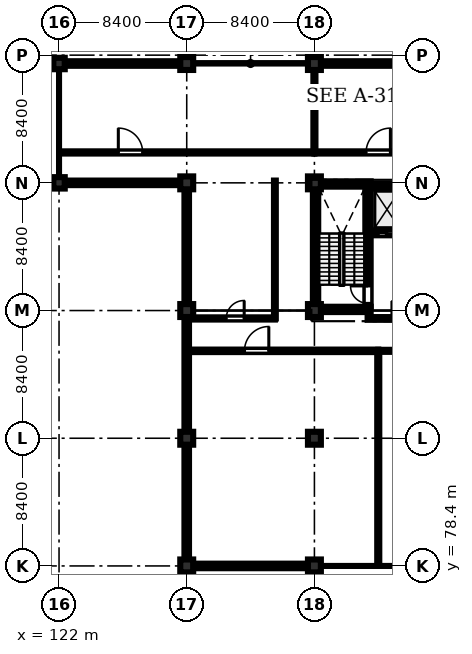
"""IFC4 building model, lengths in metres.
Left out: names, types, materials, properties, quantities, classifications, styles, units other than length and angle.
Written with IfcOpenShell. Run it as: python <this file> out.ifc"""

import sys

from ifc_helpers import new_model, si_unit, direction, frame, frame_2d, origin, origin_2d, place, context, subcontext, project, spatial, rectangle, extrude, element, fill, save


model = new_model("IFC4")
c1 = context("Model", 3, precision=1e-05, world=origin(), true_north=direction((0.0, 1.0)))
c2 = subcontext(c1, "Body", "Model", "MODEL_VIEW")
j1 = project(units=[si_unit("LENGTHUNIT", "METRE"), si_unit("PLANEANGLEUNIT", "RADIAN")], contexts=[c1])
p1 = place(None, origin())
s1 = spatial("IfcSite", under=j1, at=p1, CompositionType="ELEMENT")
p2 = place(p1, origin())
s2 = spatial("IfcBuilding", under=s1, at=p2, CompositionType="ELEMENT")
p3 = place(p2, frame((0.0, 0.0, 31.8)))
s3 = spatial("IfcBuildingStorey", under=s2, at=p3, CompositionType="ELEMENT", Elevation=31.8)
for number, where, z_axis, x_axis in (
    (1, (122.0, 103.6, 0.0), (0.0, 0.0, 1.0), (1.0, 0.0, 0.0)),
    (2, (122.0, 111.45, 0.0), (0.0, 0.0, 1.0), (1.0, 0.0, 0.0)),
):
    element("IfcColumn", number, at=place(p3, frame(where, z_axis=z_axis, x_axis=x_axis)), inside=s3, PredefinedType="COLUMN", context=c2, shape_type="SweptSolid", body=[
        extrude(rectangle(XDim=0.75, YDim=0.75, at=origin_2d()), origin(), (0.0, 0.0, 1.0), 4.02),
    ])
for number, where, z_axis, x_axis in (
    (3, (130.4, 78.4, 0.0), (0.0, 0.0, 1.0), (1.0, 0.0, 0.0)),
    (4, (130.4, 86.8, 0.0), (0.0, 0.0, 1.0), (1.0, 0.0, 0.0)),
    (5, (130.4, 95.2, 0.0), (0.0, 0.0, 1.0), (1.0, 0.0, 0.0)),
    (6, (130.4, 103.6, 0.0), (0.0, 0.0, 1.0), (1.0, 0.0, 0.0)),
    (7, (130.4, 111.45, 0.0), (0.0, 0.0, 1.0), (1.0, 0.0, 0.0)),
    (8, (138.8, 78.4, 0.0), (0.0, 0.0, 1.0), (1.0, 0.0, 0.0)),
    (9, (138.8, 86.8, 0.0), (0.0, 0.0, 1.0), (1.0, 0.0, 0.0)),
    (10, (138.8, 95.2, 0.0), (0.0, 0.0, 1.0), (1.0, 0.0, 0.0)),
    (11, (138.8, 103.6, 0.0), (0.0, 0.0, 1.0), (1.0, 0.0, 0.0)),
    (12, (138.8, 111.45, 0.0), (0.0, 0.0, 1.0), (1.0, 0.0, 0.0)),
):
    element("IfcColumn", number, at=place(p3, frame(where, z_axis=z_axis, x_axis=x_axis)), inside=s3, PredefinedType="COLUMN", context=c2, shape_type="SweptSolid", body=[
        extrude(rectangle(XDim=0.85, YDim=0.85, at=origin_2d()), origin(), (0.0, 0.0, 1.0), 4.02),
    ])
for number, where, z_axis, x_axis in (
    (13, (138.7, 95.275, 0.0), (0.0, 0.0, 1.0), (1.0, 0.0, 0.0)),
    (14, (138.7, 103.525, 0.0), (0.0, 0.0, 1.0), (1.0, 0.0, 0.0)),
):
    element("IfcWall", number, at=place(p3, frame(where, z_axis=z_axis, x_axis=x_axis)), inside=s3, PredefinedType="SHEAR", context=c2, shape_type="SweptSolid", body=[
        extrude(rectangle(XDim=3.8, YDim=0.35, at=frame_2d((1.9, 0.0))), origin(), (0.0, 0.0, 1.0), 4.02),
    ])
p4 = place(p3, frame((138.875, 95.45, 0.0), z_axis=(0.0, 0.0, 1.0), x_axis=(0.0, 1.0, 0.0)))
e15 = element("IfcWall", 15, at=p4, inside=s3, PredefinedType="SHEAR", context=c2, shape_type="SweptSolid", body=[
    extrude(rectangle(XDim=7.9, YDim=0.35, at=frame_2d((3.95, 0.0))), origin(), (0.0, 0.0, 1.0), 4.02),
])
p5 = place(p3, frame((142.325, 95.45, 0.0), z_axis=(0.0, 0.0, 1.0), x_axis=(0.0, 1.0, 0.0)))
e16 = element("IfcWall", 16, at=p5, inside=s3, PredefinedType="SHEAR", context=c2, shape_type="SweptSolid", body=[
    extrude(rectangle(XDim=7.9, YDim=0.35, at=frame_2d((3.95, 0.0))), origin(), (0.0, 0.0, 1.0), 4.02),
])
p6 = place(p5, frame((0.22, 0.0, 0.0)))
e17 = element("IfcOpeningElement", 17, at=p6, cuts=e16, PredefinedType="OPENING", context=c2, shape_type="SweptSolid", body=[
    extrude(rectangle(XDim=1.15, YDim=2.15, at=frame_2d((0.575, 1.075))), frame((0.0, 0.185, 0.0), z_axis=(0.0, -1.0, 0.0), x_axis=(1.0, 0.0, 0.0)), (0.0, 0.0, 1.0), 0.37),
])
p7 = place(p3, frame((142.5, 100.275, 0.0), z_axis=(0.0, 0.0, 1.0), x_axis=(1.0, 0.0, 0.0)))
e18 = element("IfcWall", 18, at=p7, inside=s3, PredefinedType="SHEAR", context=c2, shape_type="SweptSolid", body=[
    extrude(rectangle(XDim=2.1, YDim=0.25, at=frame_2d((1.05, 0.0))), origin(), (0.0, 0.0, 1.0), 4.02),
])
p8 = place(p7, frame((0.5, 0.0, 0.0)))
e19 = element("IfcOpeningElement", 19, at=p8, cuts=e18, PredefinedType="OPENING", context=c2, shape_type="SweptSolid", body=[
    extrude(rectangle(XDim=1.1, YDim=2.15, at=frame_2d((0.55, 1.075))), frame((0.0, 0.135, 0.0), z_axis=(0.0, -1.0, 0.0), x_axis=(1.0, 0.0, 0.0)), (0.0, 0.0, 1.0), 0.27),
])
p9 = place(p3, frame((142.5, 103.425, 0.0), z_axis=(0.0, 0.0, 1.0), x_axis=(1.0, 0.0, 0.0)))
e20 = element("IfcWall", 20, at=p9, inside=s3, PredefinedType="SHEAR", context=c2, shape_type="SweptSolid", body=[
    extrude(rectangle(XDim=2.1, YDim=0.25, at=frame_2d((1.05, 0.0))), origin(), (0.0, 0.0, 1.0), 4.02),
])
p10 = place(p3, frame((122.375, 111.45, 0.0), z_axis=(0.0, 0.0, 1.0), x_axis=(1.0, 0.0, 0.0)))
e21 = element("IfcWall", 21, at=p10, inside=s3, PredefinedType="STANDARD", context=c2, shape_type="SweptSolid", body=[
    extrude(rectangle(XDim=7.6, YDim=0.3, at=frame_2d((3.8, 0.0))), origin(), (0.0, 0.0, 1.0), 3.32),
])
p11 = place(p10, frame((0.85, 0.0, 0.9)))
e22 = element("IfcOpeningElement", 22, at=p11, cuts=e21, PredefinedType="OPENING", context=c2, shape_type="SweptSolid", body=[
    extrude(rectangle(XDim=1.8, YDim=2.1, at=frame_2d((0.9, 1.05))), frame((0.0, 0.16, 0.0), z_axis=(0.0, -1.0, 0.0), x_axis=(1.0, 0.0, 0.0)), (0.0, 0.0, 1.0), 0.32),
])
p12 = place(p10, frame((4.65, 0.0, 0.9)))
e23 = element("IfcOpeningElement", 23, at=p12, cuts=e21, PredefinedType="OPENING", context=c2, shape_type="SweptSolid", body=[
    extrude(rectangle(XDim=1.8, YDim=2.1, at=frame_2d((0.9, 1.05))), frame((0.0, 0.16, 0.0), z_axis=(0.0, -1.0, 0.0), x_axis=(1.0, 0.0, 0.0)), (0.0, 0.0, 1.0), 0.32),
])
p13 = place(p3, frame((139.225, 111.45, 0.0), z_axis=(0.0, 0.0, 1.0), x_axis=(1.0, 0.0, 0.0)))
e24 = element("IfcWall", 24, at=p13, inside=s3, PredefinedType="STANDARD", context=c2, shape_type="SweptSolid", body=[
    extrude(rectangle(XDim=7.55, YDim=0.3, at=frame_2d((3.775, 0.0))), origin(), (0.0, 0.0, 1.0), 3.32),
])
p14 = place(p13, frame((0.85, 0.0, 0.9)))
e25 = element("IfcOpeningElement", 25, at=p14, cuts=e24, PredefinedType="OPENING", context=c2, shape_type="SweptSolid", body=[
    extrude(rectangle(XDim=1.8, YDim=2.1, at=frame_2d((0.9, 1.05))), frame((0.0, 0.16, 0.0), z_axis=(0.0, -1.0, 0.0), x_axis=(1.0, 0.0, 0.0)), (0.0, 0.0, 1.0), 0.32),
])
p15 = place(p13, frame((4.65, 0.0, 0.9)))
e26 = element("IfcOpeningElement", 26, at=p15, cuts=e24, PredefinedType="OPENING", context=c2, shape_type="SweptSolid", body=[
    extrude(rectangle(XDim=1.8, YDim=2.1, at=frame_2d((0.9, 1.05))), frame((0.0, 0.16, 0.0), z_axis=(0.0, -1.0, 0.0), x_axis=(1.0, 0.0, 0.0)), (0.0, 0.0, 1.0), 0.32),
])
p16 = place(p3, frame((138.375, 78.4, 0.0), z_axis=(0.0, 0.0, 1.0), x_axis=(-1.0, 0.0, 0.0)))
e27 = element("IfcWall", 27, at=p16, inside=s3, PredefinedType="STANDARD", context=c2, shape_type="SweptSolid", body=[
    extrude(rectangle(XDim=7.55, YDim=0.3, at=frame_2d((3.775, 0.0))), origin(), (0.0, 0.0, 1.0), 3.32),
])
p17 = place(p16, frame((1.15, 0.0, 0.95)))
e28 = element("IfcOpeningElement", 28, at=p17, cuts=e27, PredefinedType="OPENING", context=c2, shape_type="SweptSolid", body=[
    extrude(rectangle(XDim=2.05, YDim=2.05, at=frame_2d((1.025, 1.025))), frame((0.0, 0.16, 0.0), z_axis=(0.0, -1.0, 0.0), x_axis=(1.0, 0.0, 0.0)), (0.0, 0.0, 1.0), 0.32),
])
p18 = place(p3, frame((130.4, 78.825, 0.0), z_axis=(0.0, 0.0, 1.0), x_axis=(0.0, 1.0, 0.0)))
e29 = element("IfcWall", 29, at=p18, inside=s3, PredefinedType="STANDARD", context=c2, shape_type="SweptSolid", body=[
    extrude(rectangle(XDim=7.55, YDim=0.3, at=frame_2d((3.775, 0.0))), origin(), (0.0, 0.0, 1.0), 3.32),
])
p19 = place(p18, frame((2.4, 0.0, 0.95)))
e30 = element("IfcOpeningElement", 30, at=p19, cuts=e29, PredefinedType="OPENING", context=c2, shape_type="SweptSolid", body=[
    extrude(rectangle(XDim=1.5, YDim=1.8, at=frame_2d((0.75, 0.9))), frame((0.0, 0.16, 0.0), z_axis=(0.0, -1.0, 0.0), x_axis=(1.0, 0.0, 0.0)), (0.0, 0.0, 1.0), 0.32),
])
p20 = place(p3, frame((130.4, 87.225, 0.0), z_axis=(0.0, 0.0, 1.0), x_axis=(0.0, 1.0, 0.0)))
e31 = element("IfcWall", 31, at=p20, inside=s3, PredefinedType="STANDARD", context=c2, shape_type="SweptSolid", body=[
    extrude(rectangle(XDim=7.55, YDim=0.3, at=frame_2d((3.775, 0.0))), origin(), (0.0, 0.0, 1.0), 3.32),
])
p21 = place(p20, frame((2.4, 0.0, 0.95)))
e32 = element("IfcOpeningElement", 32, at=p21, cuts=e31, PredefinedType="OPENING", context=c2, shape_type="SweptSolid", body=[
    extrude(rectangle(XDim=1.5, YDim=1.8, at=frame_2d((0.75, 0.9))), frame((0.0, 0.16, 0.0), z_axis=(0.0, -1.0, 0.0), x_axis=(1.0, 0.0, 0.0)), (0.0, 0.0, 1.0), 0.32),
])
p22 = place(p3, frame((130.4, 95.625, 0.0), z_axis=(0.0, 0.0, 1.0), x_axis=(0.0, 1.0, 0.0)))
e33 = element("IfcWall", 33, at=p22, inside=s3, PredefinedType="STANDARD", context=c2, shape_type="SweptSolid", body=[
    extrude(rectangle(XDim=7.55, YDim=0.3, at=frame_2d((3.775, 0.0))), origin(), (0.0, 0.0, 1.0), 3.32),
])
p23 = place(p22, frame((2.4, 0.0, 1.0)))
e34 = element("IfcOpeningElement", 34, at=p23, cuts=e33, PredefinedType="OPENING", context=c2, shape_type="SweptSolid", body=[
    extrude(rectangle(XDim=1.8, YDim=1.8, at=frame_2d((0.9, 0.9))), frame((0.0, 0.16, 0.0), z_axis=(0.0, -1.0, 0.0), x_axis=(1.0, 0.0, 0.0)), (0.0, 0.0, 1.0), 0.32),
])
p24 = place(p3, frame((129.975, 103.6, 0.0), z_axis=(0.0, 0.0, 1.0), x_axis=(-1.0, 0.0, 0.0)))
e35 = element("IfcWall", 35, at=p24, inside=s3, PredefinedType="STANDARD", context=c2, shape_type="SweptSolid", body=[
    extrude(rectangle(XDim=7.6, YDim=0.3, at=frame_2d((3.8, 0.0))), origin(), (0.0, 0.0, 1.0), 3.32),
])
p25 = place(p3, frame((142.3, 94.68, 0.0), z_axis=(0.0, 0.0, 1.0), x_axis=(1.0, 0.0, 0.0)))
e36 = element("IfcWall", 36, at=p25, inside=s3, PredefinedType="STANDARD", context=c2, shape_type="SweptSolid", body=[
    extrude(rectangle(XDim=4.8, YDim=0.18, at=frame_2d((2.4, 0.0))), origin(), (0.0, 0.0, 1.0), 4.02),
])
p26 = place(p25, frame((1.6, 0.0, 0.0)))
e37 = element("IfcOpeningElement", 37, at=p26, cuts=e36, PredefinedType="OPENING", context=c2, shape_type="SweptSolid", body=[
    extrude(rectangle(XDim=1.15, YDim=2.15, at=frame_2d((0.575, 1.075))), frame((0.0, 0.1, 0.0), z_axis=(0.0, -1.0, 0.0), x_axis=(1.0, 0.0, 0.0)), (0.0, 0.0, 1.0), 0.2),
])
p27 = place(p3, frame((136.2, 94.68, 0.0), z_axis=(0.0, 0.0, 1.0), x_axis=(0.0, 1.0, 0.0)))
e38 = element("IfcWall", 38, at=p27, inside=s3, PredefinedType="PARTITIONING", context=c2, shape_type="SweptSolid", body=[
    extrude(rectangle(XDim=9.07, YDim=0.12, at=frame_2d((4.535, 0.0))), origin(), (0.0, 0.0, 1.0), 4.02),
])
p28 = place(p3, frame((130.8, 94.68, 0.0), z_axis=(0.0, 0.0, 1.0), x_axis=(1.0, 0.0, 0.0)))
e39 = element("IfcWall", 39, at=p28, inside=s3, PredefinedType="PARTITIONING", context=c2, shape_type="SweptSolid", body=[
    extrude(rectangle(XDim=5.4, YDim=0.145, at=frame_2d((2.7, 0.0))), origin(), (0.0, 0.0, 1.0), 4.02),
])
p29 = place(p28, frame((2.2, 0.0, 0.0)))
e40 = element("IfcOpeningElement", 40, at=p29, cuts=e39, PredefinedType="OPENING", context=c2, shape_type="SweptSolid", body=[
    extrude(rectangle(XDim=1.18, YDim=2.18, at=frame_2d((0.59, 1.09))), frame((0.0, 0.083, 0.0), z_axis=(0.0, -1.0, 0.0), x_axis=(1.0, 0.0, 0.0)), (0.0, 0.0, 1.0), 0.165),
])
p30 = place(p3, frame((122.15, 105.6, 0.0), z_axis=(0.0, 0.0, 1.0), x_axis=(1.0, 0.0, 0.0)))
e41 = element("IfcWall", 41, at=p30, inside=s3, PredefinedType="PARTITIONING", context=c2, shape_type="SweptSolid", body=[
    extrude(rectangle(XDim=16.65, YDim=0.145, at=frame_2d((8.325, 0.0))), origin(), (0.0, 0.0, 1.0), 4.02),
])
p31 = place(p30, frame((3.75, 0.0, 0.0)))
e42 = element("IfcOpeningElement", 42, at=p31, cuts=e41, PredefinedType="OPENING", context=c2, shape_type="SweptSolid", body=[
    extrude(rectangle(XDim=1.6, YDim=2.24, at=frame_2d((0.8, 1.12))), frame((0.0, 0.083, 0.0), z_axis=(0.0, -1.0, 0.0), x_axis=(1.0, 0.0, 0.0)), (0.0, 0.0, 1.0), 0.165),
])
p32 = place(p3, frame((138.8, 105.6, 0.0), z_axis=(0.0, 0.0, 1.0), x_axis=(1.0, 0.0, 0.0)))
e43 = element("IfcWall", 43, at=p32, inside=s3, PredefinedType="PARTITIONING", context=c2, shape_type="SweptSolid", body=[
    extrude(rectangle(XDim=16.8, YDim=0.145, at=frame_2d((8.4, 0.0))), origin(), (0.0, 0.0, 1.0), 4.02),
])
p33 = place(p32, frame((3.4, 0.0, 0.0)))
e44 = element("IfcOpeningElement", 44, at=p33, cuts=e43, PredefinedType="OPENING", context=c2, shape_type="SweptSolid", body=[
    extrude(rectangle(XDim=1.6, YDim=2.24, at=frame_2d((0.8, 1.12))), frame((0.0, 0.083, 0.0), z_axis=(0.0, -1.0, 0.0), x_axis=(1.0, 0.0, 0.0)), (0.0, 0.0, 1.0), 0.165),
])
p34 = place(p3, frame((138.8, 105.6, 0.0), z_axis=(0.0, 0.0, 1.0), x_axis=(0.0, 1.0, 0.0)))
e45 = element("IfcWall", 45, at=p34, inside=s3, PredefinedType="PARTITIONING", context=c2, shape_type="SweptSolid", body=[
    extrude(rectangle(XDim=5.75, YDim=0.135, at=frame_2d((2.875, 0.0))), origin(), (0.0, 0.0, 1.0), 3.32),
])
p35 = place(p3, frame((130.55, 92.55, 0.0), z_axis=(0.0, 0.0, 1.0), x_axis=(1.0, 0.0, 0.0)))
e46 = element("IfcWall", 46, at=p35, inside=s3, PredefinedType="PARTITIONING", context=c2, shape_type="SweptSolid", body=[
    extrude(rectangle(XDim=12.45, YDim=0.165, at=frame_2d((6.225, 0.0))), origin(), (0.0, 0.0, 1.0), 4.02),
])
p36 = place(p35, frame((3.65, 0.0, 0.0)))
e47 = element("IfcOpeningElement", 47, at=p36, cuts=e46, PredefinedType="OPENING", context=c2, shape_type="SweptSolid", body=[
    extrude(rectangle(XDim=1.6, YDim=2.24, at=frame_2d((0.8, 1.12))), frame((0.0, 0.093, 0.0), z_axis=(0.0, -1.0, 0.0), x_axis=(1.0, 0.0, 0.0)), (0.0, 0.0, 1.0), 0.185),
])
p37 = place(p3, frame((143.0, 92.55, 0.0), z_axis=(0.0, 0.0, 1.0), x_axis=(1.0, 0.0, 0.0)))
e48 = element("IfcWall", 48, at=p37, inside=s3, PredefinedType="PARTITIONING", context=c2, shape_type="SweptSolid", body=[
    extrude(rectangle(XDim=12.6, YDim=0.135, at=frame_2d((6.3, 0.0))), origin(), (0.0, 0.0, 1.0), 4.02),
])
p38 = place(p37, frame((6.8, 0.0, 0.0)))
e49 = element("IfcOpeningElement", 49, at=p38, cuts=e48, PredefinedType="OPENING", context=c2, shape_type="SweptSolid", body=[
    extrude(rectangle(XDim=1.08, YDim=2.15, at=frame_2d((0.54, 1.075))), frame((0.0, 0.077, 0.0), z_axis=(0.0, -1.0, 0.0), x_axis=(1.0, 0.0, 0.0)), (0.0, 0.0, 1.0), 0.155),
])
p39 = place(p3, frame((143.0, 78.55, 0.0), z_axis=(0.0, 0.0, 1.0), x_axis=(0.0, 1.0, 0.0)))
e50 = element("IfcWall", 50, at=p39, inside=s3, PredefinedType="PARTITIONING", context=c2, shape_type="SweptSolid", body=[
    extrude(rectangle(XDim=14.0, YDim=0.135, at=frame_2d((7.0, 0.0))), origin(), (0.0, 0.0, 1.0), 3.52),
])
p40 = place(p11, origin())
e51 = element("IfcWindow", 51, at=p40, inside=s3, PartitioningType="DOUBLE_PANEL_VERTICAL", PredefinedType="WINDOW", context=c2, shape_type="SweptSolid", body=[
    extrude(rectangle(XDim=1.8, YDim=2.1, at=frame_2d((0.9, 1.05))), frame((0.0, 0.03, 0.0), z_axis=(0.0, -1.0, 0.0), x_axis=(1.0, 0.0, 0.0)), (0.0, 0.0, 1.0), 0.06),
])
fill(e22, e51)
p41 = place(p12, origin())
e52 = element("IfcWindow", 52, at=p41, inside=s3, PartitioningType="DOUBLE_PANEL_VERTICAL", PredefinedType="WINDOW", context=c2, shape_type="SweptSolid", body=[
    extrude(rectangle(XDim=1.8, YDim=2.1, at=frame_2d((0.9, 1.05))), frame((0.0, 0.03, 0.0), z_axis=(0.0, -1.0, 0.0), x_axis=(1.0, 0.0, 0.0)), (0.0, 0.0, 1.0), 0.06),
])
fill(e23, e52)
p42 = place(p14, origin())
e53 = element("IfcWindow", 53, at=p42, inside=s3, PartitioningType="DOUBLE_PANEL_VERTICAL", PredefinedType="WINDOW", context=c2, shape_type="SweptSolid", body=[
    extrude(rectangle(XDim=1.8, YDim=2.1, at=frame_2d((0.9, 1.05))), frame((0.0, 0.03, 0.0), z_axis=(0.0, -1.0, 0.0), x_axis=(1.0, 0.0, 0.0)), (0.0, 0.0, 1.0), 0.06),
])
fill(e25, e53)
p43 = place(p15, origin())
e54 = element("IfcWindow", 54, at=p43, inside=s3, PartitioningType="DOUBLE_PANEL_VERTICAL", PredefinedType="WINDOW", context=c2, shape_type="SweptSolid", body=[
    extrude(rectangle(XDim=1.8, YDim=2.1, at=frame_2d((0.9, 1.05))), frame((0.0, 0.03, 0.0), z_axis=(0.0, -1.0, 0.0), x_axis=(1.0, 0.0, 0.0)), (0.0, 0.0, 1.0), 0.06),
])
fill(e26, e54)
p44 = place(p17, origin())
e55 = element("IfcWindow", 55, at=p44, inside=s3, PartitioningType="DOUBLE_PANEL_VERTICAL", PredefinedType="WINDOW", context=c2, shape_type="SweptSolid", body=[
    extrude(rectangle(XDim=2.05, YDim=2.05, at=frame_2d((1.025, 1.025))), frame((0.0, 0.03, 0.0), z_axis=(0.0, -1.0, 0.0), x_axis=(1.0, 0.0, 0.0)), (0.0, 0.0, 1.0), 0.06),
])
fill(e28, e55)
p45 = place(p19, origin())
e56 = element("IfcWindow", 56, at=p45, inside=s3, PartitioningType="DOUBLE_PANEL_VERTICAL", PredefinedType="WINDOW", context=c2, shape_type="SweptSolid", body=[
    extrude(rectangle(XDim=1.5, YDim=1.8, at=frame_2d((0.75, 0.9))), frame((0.0, 0.03, 0.0), z_axis=(0.0, -1.0, 0.0), x_axis=(1.0, 0.0, 0.0)), (0.0, 0.0, 1.0), 0.06),
])
fill(e30, e56)
p46 = place(p21, origin())
e57 = element("IfcWindow", 57, at=p46, inside=s3, PartitioningType="DOUBLE_PANEL_VERTICAL", PredefinedType="WINDOW", context=c2, shape_type="SweptSolid", body=[
    extrude(rectangle(XDim=1.5, YDim=1.8, at=frame_2d((0.75, 0.9))), frame((0.0, 0.03, 0.0), z_axis=(0.0, -1.0, 0.0), x_axis=(1.0, 0.0, 0.0)), (0.0, 0.0, 1.0), 0.06),
])
fill(e32, e57)
p47 = place(p23, origin())
e58 = element("IfcWindow", 58, at=p47, inside=s3, PartitioningType="DOUBLE_PANEL_VERTICAL", PredefinedType="WINDOW", context=c2, shape_type="SweptSolid", body=[
    extrude(rectangle(XDim=1.8, YDim=1.8, at=frame_2d((0.9, 0.9))), frame((0.0, 0.03, 0.0), z_axis=(0.0, -1.0, 0.0), x_axis=(1.0, 0.0, 0.0)), (0.0, 0.0, 1.0), 0.06),
])
fill(e34, e58)
p48 = place(p26, origin())
e59 = element("IfcDoor", 59, at=p48, inside=s3, OperationType="SINGLE_SWING_LEFT", PredefinedType="DOOR", context=c2, shape_type="SweptSolid", body=[
    extrude(rectangle(XDim=1.15, YDim=2.15, at=frame_2d((0.575, 1.075))), frame((0.0, 0.025, 0.0), z_axis=(0.0, -1.0, 0.0), x_axis=(1.0, 0.0, 0.0)), (0.0, 0.0, 1.0), 0.05),
])
fill(e37, e59)
p49 = place(p29, origin())
e60 = element("IfcDoor", 60, at=p49, inside=s3, OperationType="SINGLE_SWING_RIGHT", PredefinedType="DOOR", context=c2, shape_type="SweptSolid", body=[
    extrude(rectangle(XDim=1.18, YDim=2.18, at=frame_2d((0.59, 1.09))), frame((0.0, 0.025, 0.0), z_axis=(0.0, -1.0, 0.0), x_axis=(1.0, 0.0, 0.0)), (0.0, 0.0, 1.0), 0.05),
])
fill(e40, e60)
p50 = place(p31, origin())
e61 = element("IfcDoor", 61, at=p50, inside=s3, OperationType="SINGLE_SWING_LEFT", PredefinedType="DOOR", context=c2, shape_type="SweptSolid", body=[
    extrude(rectangle(XDim=1.6, YDim=2.24, at=frame_2d((0.8, 1.12))), frame((0.0, 0.025, 0.0), z_axis=(0.0, -1.0, 0.0), x_axis=(1.0, 0.0, 0.0)), (0.0, 0.0, 1.0), 0.05),
])
fill(e42, e61)
p51 = place(p33, origin())
e62 = element("IfcDoor", 62, at=p51, inside=s3, OperationType="SINGLE_SWING_RIGHT", PredefinedType="DOOR", context=c2, shape_type="SweptSolid", body=[
    extrude(rectangle(XDim=1.6, YDim=2.24, at=frame_2d((0.8, 1.12))), frame((0.0, 0.025, 0.0), z_axis=(0.0, -1.0, 0.0), x_axis=(1.0, 0.0, 0.0)), (0.0, 0.0, 1.0), 0.05),
])
fill(e44, e62)
p52 = place(p36, origin())
e63 = element("IfcDoor", 63, at=p52, inside=s3, OperationType="SINGLE_SWING_RIGHT", PredefinedType="DOOR", context=c2, shape_type="SweptSolid", body=[
    extrude(rectangle(XDim=1.6, YDim=2.24, at=frame_2d((0.8, 1.12))), frame((0.0, 0.025, 0.0), z_axis=(0.0, -1.0, 0.0), x_axis=(1.0, 0.0, 0.0)), (0.0, 0.0, 1.0), 0.05),
])
fill(e47, e63)
p53 = place(p6, origin())
e64 = element("IfcDoor", 64, at=p53, inside=s3, OperationType="SINGLE_SWING_RIGHT", PredefinedType="DOOR", context=c2, shape_type="SweptSolid", body=[
    extrude(rectangle(XDim=1.15, YDim=2.15, at=frame_2d((0.575, 1.075))), frame((0.0, 0.025, 0.0), z_axis=(0.0, -1.0, 0.0), x_axis=(1.0, 0.0, 0.0)), (0.0, 0.0, 1.0), 0.05),
])
fill(e17, e64)
p54 = place(p8, origin())
e65 = element("IfcDoor", 65, at=p54, inside=s3, OperationType="SLIDING_TO_LEFT", PredefinedType="DOOR", context=c2, shape_type="SweptSolid", body=[
    extrude(rectangle(XDim=1.1, YDim=2.15, at=frame_2d((0.55, 1.075))), frame((0.0, 0.025, 0.0), z_axis=(0.0, -1.0, 0.0), x_axis=(1.0, 0.0, 0.0)), (0.0, 0.0, 1.0), 0.05),
])
fill(e19, e65)
save(model, sys.argv[1])
